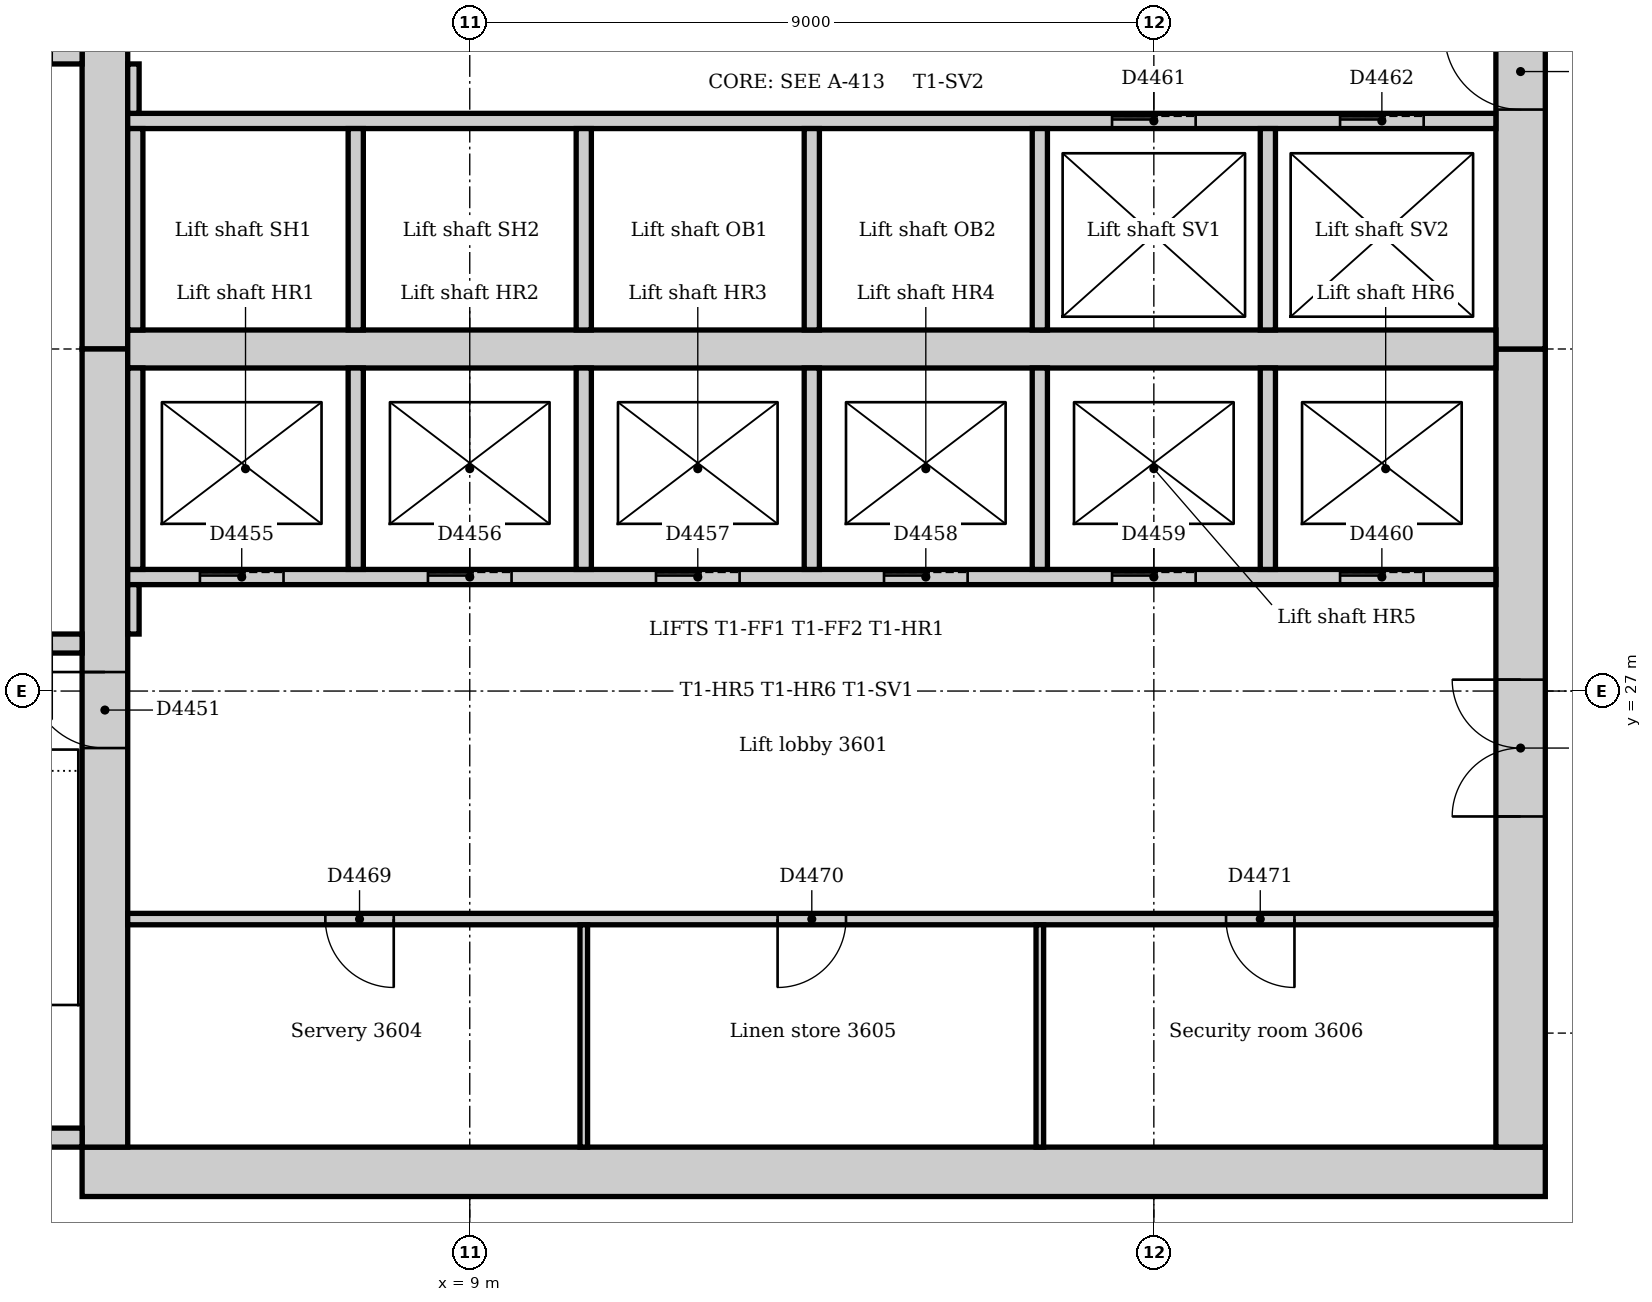
"""IFC4 building model, lengths in metres.
Left out: names, types, materials, properties, quantities, classifications, styles, units other than length and angle.
Written with IfcOpenShell. Run it as: python <this file> out.ifc"""

import sys

from ifc_helpers import new_model, si_unit, direction, frame, frame_2d, origin, place, context, subcontext, project, spatial, rectangle, extrude, element, fill, save


model = new_model("IFC4")
c1 = context("Model", 3, precision=1e-05, world=origin(), true_north=direction((0.0, 1.0)))
c2 = subcontext(c1, "Body", "Model", "MODEL_VIEW")
j1 = project(units=[si_unit("LENGTHUNIT", "METRE"), si_unit("PLANEANGLEUNIT", "RADIAN")], contexts=[c1])
p1 = place(None, origin())
s1 = spatial("IfcSite", under=j1, at=p1, CompositionType="ELEMENT")
p2 = place(p1, origin())
s2 = spatial("IfcBuilding", under=s1, at=p2, CompositionType="ELEMENT")
p3 = place(p2, frame((0.0, 0.0, 153.0)))
s3 = spatial("IfcBuildingStorey", under=s2, at=p3, CompositionType="ELEMENT", Elevation=153.0)
p4 = place(p3, frame((3.9, 20.675, 0.0), z_axis=(0.0, 0.0, 1.0), x_axis=(1.0, 0.0, 0.0)))
e1 = element("IfcWall", 1, at=p4, inside=s3, PredefinedType="SOLIDWALL", context=c2, shape_type="SweptSolid", body=[
    extrude(rectangle(XDim=19.25, YDim=0.65, at=frame_2d((9.625, 0.0))), origin(), (0.0, 0.0, 1.0), 4.0),
])
p5 = place(p3, frame((22.825, 21.0, 0.0), z_axis=(0.0, 0.0, 1.0), x_axis=(0.0, 1.0, 0.0)))
e2 = element("IfcWall", 2, at=p5, inside=s3, PredefinedType="SOLIDWALL", context=c2, shape_type="SweptSolid", body=[
    extrude(rectangle(XDim=10.5, YDim=0.65, at=frame_2d((5.25, 0.0))), origin(), (0.0, 0.0, 1.0), 4.0),
])
p6 = place(p5, frame((4.35, 0.0, 0.0)))
e3 = element("IfcOpeningElement", 3, at=p6, cuts=e2, PredefinedType="OPENING", context=c2, shape_type="SweptSolid", body=[
    extrude(rectangle(XDim=1.8, YDim=2.1, at=frame_2d((0.9, 1.05))), frame((0.0, 0.335, 0.0), z_axis=(0.0, -1.0, 0.0), x_axis=(1.0, 0.0, 0.0)), (0.0, 0.0, 1.0), 0.67),
])
p7 = place(p3, frame((22.825, 31.5, 0.0), z_axis=(0.0, 0.0, 1.0), x_axis=(0.0, 1.0, 0.0)))
e4 = element("IfcWall", 4, at=p7, inside=s3, PredefinedType="SOLIDWALL", context=c2, shape_type="SweptSolid", body=[
    extrude(rectangle(XDim=10.5, YDim=0.65, at=frame_2d((5.25, 0.0))), origin(), (0.0, 0.0, 1.0), 4.0),
])
p8 = place(p7, frame((3.15, 0.0, 0.0)))
e5 = element("IfcOpeningElement", 5, at=p8, cuts=e4, PredefinedType="OPENING", context=c2, shape_type="SweptSolid", body=[
    extrude(rectangle(XDim=1.0, YDim=2.1, at=frame_2d((0.5, 1.05))), frame((0.0, 0.335, 0.0), z_axis=(0.0, -1.0, 0.0), x_axis=(1.0, 0.0, 0.0)), (0.0, 0.0, 1.0), 0.67),
])
p9 = place(p7, frame((5.2, 0.0, 0.0)))
e6 = element("IfcOpeningElement", 6, at=p9, cuts=e4, PredefinedType="OPENING", context=c2, shape_type="SweptSolid", body=[
    extrude(rectangle(XDim=1.0, YDim=2.1, at=frame_2d((0.5, 1.05))), frame((0.0, 0.335, 0.0), z_axis=(0.0, -1.0, 0.0), x_axis=(1.0, 0.0, 0.0)), (0.0, 0.0, 1.0), 0.67),
])
p10 = place(p3, frame((4.2, 42.0, 0.0), z_axis=(0.0, 0.0, 1.0), x_axis=(0.0, -1.0, 0.0)))
e7 = element("IfcWall", 7, at=p10, inside=s3, PredefinedType="SOLIDWALL", context=c2, shape_type="SweptSolid", body=[
    extrude(rectangle(XDim=10.5, YDim=0.6, at=frame_2d((5.25, 0.0))), origin(), (0.0, 0.0, 1.0), 4.0),
])
p11 = place(p10, frame((5.3, 0.0, 0.0)))
e8 = element("IfcOpeningElement", 8, at=p11, cuts=e7, PredefinedType="OPENING", context=c2, shape_type="SweptSolid", body=[
    extrude(rectangle(XDim=1.0, YDim=2.1, at=frame_2d((0.5, 1.05))), frame((0.0, 0.31, 0.0), z_axis=(0.0, -1.0, 0.0), x_axis=(1.0, 0.0, 0.0)), (0.0, 0.0, 1.0), 0.62),
])
p12 = place(p3, frame((4.2, 31.5, 0.0), z_axis=(0.0, 0.0, 1.0), x_axis=(0.0, -1.0, 0.0)))
e9 = element("IfcWall", 9, at=p12, inside=s3, PredefinedType="SOLIDWALL", context=c2, shape_type="SweptSolid", body=[
    extrude(rectangle(XDim=10.5, YDim=0.6, at=frame_2d((5.25, 0.0))), origin(), (0.0, 0.0, 1.0), 4.0),
])
p13 = place(p12, frame((4.25, 0.0, 0.0)))
e10 = element("IfcOpeningElement", 10, at=p13, cuts=e9, PredefinedType="OPENING", context=c2, shape_type="SweptSolid", body=[
    extrude(rectangle(XDim=1.0, YDim=2.1, at=frame_2d((0.5, 1.05))), frame((0.0, 0.31, 0.0), z_axis=(0.0, -1.0, 0.0), x_axis=(1.0, 0.0, 0.0)), (0.0, 0.0, 1.0), 0.62),
])
p14 = place(p3, frame((4.5, 31.5, 0.0), z_axis=(0.0, 0.0, 1.0), x_axis=(1.0, 0.0, 0.0)))
e11 = element("IfcWall", 11, at=p14, inside=s3, PredefinedType="SOLIDWALL", context=c2, shape_type="SweptSolid", body=[
    extrude(rectangle(XDim=18.0, YDim=0.5, at=frame_2d((9.0, 0.0))), origin(), (0.0, 0.0, 1.0), 4.0),
])
p15 = place(p3, frame((0.36, 21.125, 0.0), z_axis=(0.0, 0.0, 1.0), x_axis=(1.0, 0.0, 0.0)))
e12 = element("IfcWall", 12, at=p15, inside=s3, PredefinedType="SOLIDWALL", context=c2, shape_type="SweptSolid", body=[
    extrude(rectangle(XDim=3.54, YDim=0.25, at=frame_2d((1.77, 0.0))), origin(), (0.0, 0.0, 1.0), 4.0),
])
p16 = place(p3, frame((3.9, 27.625, 0.0), z_axis=(0.0, 0.0, 1.0), x_axis=(-1.0, 0.0, 0.0)))
e13 = element("IfcWall", 13, at=p16, inside=s3, PredefinedType="SOLIDWALL", context=c2, shape_type="SweptSolid", body=[
    extrude(rectangle(XDim=3.54, YDim=0.25, at=frame_2d((1.77, 0.0))), origin(), (0.0, 0.0, 1.0), 4.0),
])
p17 = place(p16, frame((0.4, 0.0, 0.0)))
e14 = element("IfcOpeningElement", 14, at=p17, cuts=e13, PredefinedType="OPENING", context=c2, shape_type="SweptSolid", body=[
    extrude(rectangle(XDim=1.0, YDim=2.1, at=frame_2d((0.5, 1.05))), frame((0.0, 0.135, 0.0), z_axis=(0.0, -1.0, 0.0), x_axis=(1.0, 0.0, 0.0)), (0.0, 0.0, 1.0), 0.27),
])
p18 = place(p3, frame((0.36, 35.375, 0.0), z_axis=(0.0, 0.0, 1.0), x_axis=(1.0, 0.0, 0.0)))
e15 = element("IfcWall", 15, at=p18, inside=s3, PredefinedType="SOLIDWALL", context=c2, shape_type="SweptSolid", body=[
    extrude(rectangle(XDim=3.54, YDim=0.25, at=frame_2d((1.77, 0.0))), origin(), (0.0, 0.0, 1.0), 4.0),
])
p19 = place(p18, frame((2.14, 0.0, 0.0)))
e16 = element("IfcOpeningElement", 16, at=p19, cuts=e15, PredefinedType="OPENING", context=c2, shape_type="SweptSolid", body=[
    extrude(rectangle(XDim=1.0, YDim=2.1, at=frame_2d((0.5, 1.05))), frame((0.0, 0.135, 0.0), z_axis=(0.0, -1.0, 0.0), x_axis=(1.0, 0.0, 0.0)), (0.0, 0.0, 1.0), 0.27),
])
p20 = place(p3, frame((4.5, 28.5, 0.0), z_axis=(0.0, 0.0, 1.0), x_axis=(1.0, 0.0, 0.0)))
e17 = element("IfcWall", 17, at=p20, inside=s3, PredefinedType="PARTITIONING", context=c2, shape_type="SweptSolid", body=[
    extrude(rectangle(XDim=18.0, YDim=0.2, at=frame_2d((9.0, 0.0))), origin(), (0.0, 0.0, 1.0), 3.85),
])
p21 = place(p20, frame((0.95, 0.0, 0.0)))
e18 = element("IfcOpeningElement", 18, at=p21, cuts=e17, PredefinedType="OPENING", context=c2, shape_type="SweptSolid", body=[
    extrude(rectangle(XDim=1.1, YDim=2.1, at=frame_2d((0.55, 1.05))), frame((0.0, 0.11, 0.0), z_axis=(0.0, -1.0, 0.0), x_axis=(1.0, 0.0, 0.0)), (0.0, 0.0, 1.0), 0.22),
])
p22 = place(p20, frame((3.95, 0.0, 0.0)))
e19 = element("IfcOpeningElement", 19, at=p22, cuts=e17, PredefinedType="OPENING", context=c2, shape_type="SweptSolid", body=[
    extrude(rectangle(XDim=1.1, YDim=2.1, at=frame_2d((0.55, 1.05))), frame((0.0, 0.11, 0.0), z_axis=(0.0, -1.0, 0.0), x_axis=(1.0, 0.0, 0.0)), (0.0, 0.0, 1.0), 0.22),
])
p23 = place(p20, frame((6.95, 0.0, 0.0)))
e20 = element("IfcOpeningElement", 20, at=p23, cuts=e17, PredefinedType="OPENING", context=c2, shape_type="SweptSolid", body=[
    extrude(rectangle(XDim=1.1, YDim=2.1, at=frame_2d((0.55, 1.05))), frame((0.0, 0.11, 0.0), z_axis=(0.0, -1.0, 0.0), x_axis=(1.0, 0.0, 0.0)), (0.0, 0.0, 1.0), 0.22),
])
p24 = place(p20, frame((9.95, 0.0, 0.0)))
e21 = element("IfcOpeningElement", 21, at=p24, cuts=e17, PredefinedType="OPENING", context=c2, shape_type="SweptSolid", body=[
    extrude(rectangle(XDim=1.1, YDim=2.1, at=frame_2d((0.55, 1.05))), frame((0.0, 0.11, 0.0), z_axis=(0.0, -1.0, 0.0), x_axis=(1.0, 0.0, 0.0)), (0.0, 0.0, 1.0), 0.22),
])
p25 = place(p20, frame((12.95, 0.0, 0.0)))
e22 = element("IfcOpeningElement", 22, at=p25, cuts=e17, PredefinedType="OPENING", context=c2, shape_type="SweptSolid", body=[
    extrude(rectangle(XDim=1.1, YDim=2.1, at=frame_2d((0.55, 1.05))), frame((0.0, 0.11, 0.0), z_axis=(0.0, -1.0, 0.0), x_axis=(1.0, 0.0, 0.0)), (0.0, 0.0, 1.0), 0.22),
])
p26 = place(p20, frame((15.95, 0.0, 0.0)))
e23 = element("IfcOpeningElement", 23, at=p26, cuts=e17, PredefinedType="OPENING", context=c2, shape_type="SweptSolid", body=[
    extrude(rectangle(XDim=1.1, YDim=2.1, at=frame_2d((0.55, 1.05))), frame((0.0, 0.11, 0.0), z_axis=(0.0, -1.0, 0.0), x_axis=(1.0, 0.0, 0.0)), (0.0, 0.0, 1.0), 0.22),
])
p27 = place(p3, frame((4.5, 34.5, 0.0), z_axis=(0.0, 0.0, 1.0), x_axis=(1.0, 0.0, 0.0)))
e24 = element("IfcWall", 24, at=p27, inside=s3, PredefinedType="PARTITIONING", context=c2, shape_type="SweptSolid", body=[
    extrude(rectangle(XDim=18.0, YDim=0.2, at=frame_2d((9.0, 0.0))), origin(), (0.0, 0.0, 1.0), 3.85),
])
p28 = place(p27, frame((12.95, 0.0, 0.0)))
e25 = element("IfcOpeningElement", 25, at=p28, cuts=e24, PredefinedType="OPENING", context=c2, shape_type="SweptSolid", body=[
    extrude(rectangle(XDim=1.1, YDim=2.1, at=frame_2d((0.55, 1.05))), frame((0.0, 0.11, 0.0), z_axis=(0.0, -1.0, 0.0), x_axis=(1.0, 0.0, 0.0)), (0.0, 0.0, 1.0), 0.22),
])
p29 = place(p27, frame((15.95, 0.0, 0.0)))
e26 = element("IfcOpeningElement", 26, at=p29, cuts=e24, PredefinedType="OPENING", context=c2, shape_type="SweptSolid", body=[
    extrude(rectangle(XDim=1.1, YDim=2.1, at=frame_2d((0.55, 1.05))), frame((0.0, 0.11, 0.0), z_axis=(0.0, -1.0, 0.0), x_axis=(1.0, 0.0, 0.0)), (0.0, 0.0, 1.0), 0.22),
])
for number, where, z_axis, x_axis in (
    (27, (4.6, 31.75, 0.0), (0.0, 0.0, 1.0), (0.0, 1.0, 0.0)),
    (28, (4.6, 28.6, 0.0), (0.0, 0.0, 1.0), (0.0, 1.0, 0.0)),
    (29, (7.5, 28.6, 0.0), (0.0, 0.0, 1.0), (0.0, 1.0, 0.0)),
    (30, (7.5, 31.75, 0.0), (0.0, 0.0, 1.0), (0.0, 1.0, 0.0)),
    (31, (10.5, 28.6, 0.0), (0.0, 0.0, 1.0), (0.0, 1.0, 0.0)),
    (32, (10.5, 31.75, 0.0), (0.0, 0.0, 1.0), (0.0, 1.0, 0.0)),
    (33, (13.5, 28.6, 0.0), (0.0, 0.0, 1.0), (0.0, 1.0, 0.0)),
    (34, (13.5, 31.75, 0.0), (0.0, 0.0, 1.0), (0.0, 1.0, 0.0)),
    (35, (16.5, 28.6, 0.0), (0.0, 0.0, 1.0), (0.0, 1.0, 0.0)),
    (36, (16.5, 31.75, 0.0), (0.0, 0.0, 1.0), (0.0, 1.0, 0.0)),
    (37, (19.5, 28.6, 0.0), (0.0, 0.0, 1.0), (0.0, 1.0, 0.0)),
    (38, (19.5, 31.75, 0.0), (0.0, 0.0, 1.0), (0.0, 1.0, 0.0)),
):
    element("IfcWall", number, at=place(p3, frame(where, z_axis=z_axis, x_axis=x_axis)), inside=s3, PredefinedType="PARTITIONING", context=c2, shape_type="SweptSolid", body=[
        extrude(rectangle(XDim=2.65, YDim=0.2, at=frame_2d((1.325, 0.0))), origin(), (0.0, 0.0, 1.0), 3.85),
    ])
p30 = place(p3, frame((4.5, 24.0, 0.0), z_axis=(0.0, 0.0, 1.0), x_axis=(1.0, 0.0, 0.0)))
e39 = element("IfcWall", 39, at=p30, inside=s3, PredefinedType="PARTITIONING", context=c2, shape_type="SweptSolid", body=[
    extrude(rectangle(XDim=18.0, YDim=0.15, at=frame_2d((9.0, 0.0))), origin(), (0.0, 0.0, 1.0), 3.85),
])
p31 = place(p30, frame((2.6, 0.0, 0.0)))
e40 = element("IfcOpeningElement", 40, at=p31, cuts=e39, PredefinedType="OPENING", context=c2, shape_type="SweptSolid", body=[
    extrude(rectangle(XDim=0.9, YDim=2.1, at=frame_2d((0.45, 1.05))), frame((0.0, 0.085, 0.0), z_axis=(0.0, -1.0, 0.0), x_axis=(1.0, 0.0, 0.0)), (0.0, 0.0, 1.0), 0.17),
])
p32 = place(p30, frame((8.55, 0.0, 0.0)))
e41 = element("IfcOpeningElement", 41, at=p32, cuts=e39, PredefinedType="OPENING", context=c2, shape_type="SweptSolid", body=[
    extrude(rectangle(XDim=0.9, YDim=2.1, at=frame_2d((0.45, 1.05))), frame((0.0, 0.085, 0.0), z_axis=(0.0, -1.0, 0.0), x_axis=(1.0, 0.0, 0.0)), (0.0, 0.0, 1.0), 0.17),
])
p33 = place(p30, frame((14.45, 0.0, 0.0)))
e42 = element("IfcOpeningElement", 42, at=p33, cuts=e39, PredefinedType="OPENING", context=c2, shape_type="SweptSolid", body=[
    extrude(rectangle(XDim=0.9, YDim=2.1, at=frame_2d((0.45, 1.05))), frame((0.0, 0.085, 0.0), z_axis=(0.0, -1.0, 0.0), x_axis=(1.0, 0.0, 0.0)), (0.0, 0.0, 1.0), 0.17),
])
for number, where, z_axis, x_axis in (
    (43, (4.575, 27.75, 0.0), (0.0, 0.0, 1.0), (0.0, 1.0, 0.0)),
    (44, (4.575, 34.6, 0.0), (0.0, 0.0, 1.0), (0.0, 1.0, 0.0)),
):
    element("IfcWall", number, at=place(p3, frame(where, z_axis=z_axis, x_axis=x_axis)), inside=s3, PredefinedType="PARTITIONING", context=c2, shape_type="SweptSolid", body=[
        extrude(rectangle(XDim=0.65, YDim=0.15, at=frame_2d((0.325, 0.0))), origin(), (0.0, 0.0, 1.0), 3.85),
    ])
for number, where, z_axis, x_axis in (
    (45, (10.5, 21.0, 0.0), (0.0, 0.0, 1.0), (0.0, 1.0, 0.0)),
    (46, (16.5, 21.0, 0.0), (0.0, 0.0, 1.0), (0.0, 1.0, 0.0)),
):
    element("IfcWall", number, at=place(p3, frame(where, z_axis=z_axis, x_axis=x_axis)), inside=s3, PredefinedType="PARTITIONING", context=c2, shape_type="SweptSolid", body=[
        extrude(rectangle(XDim=2.925, YDim=0.1, at=frame_2d((1.462, 0.0))), origin(), (0.0, 0.0, 1.0), 3.85),
    ])
p34 = place(p13, frame((1.0, 0.0, 0.0), z_axis=(0.0, 0.0, 1.0), x_axis=(-1.0, 0.0, 0.0)))
e47 = element("IfcDoor", 47, at=p34, inside=s3, OperationType="SINGLE_SWING_RIGHT", PredefinedType="DOOR", context=c2, shape_type="SweptSolid", body=[
    extrude(rectangle(XDim=1.0, YDim=2.1, at=frame_2d((0.5, 1.05))), frame((0.0, 0.025, 0.0), z_axis=(0.0, -1.0, 0.0), x_axis=(1.0, 0.0, 0.0)), (0.0, 0.0, 1.0), 0.05),
])
fill(e10, e47)
p35 = place(p21, origin())
e48 = element("IfcDoor", 48, at=p35, inside=s3, OperationType="SLIDING_TO_LEFT", PredefinedType="DOOR", context=c2, shape_type="SweptSolid", body=[
    extrude(rectangle(XDim=1.1, YDim=2.1, at=frame_2d((0.55, 1.05))), frame((0.0, 0.025, 0.0), z_axis=(0.0, -1.0, 0.0), x_axis=(1.0, 0.0, 0.0)), (0.0, 0.0, 1.0), 0.05),
])
fill(e18, e48)
p36 = place(p22, origin())
e49 = element("IfcDoor", 49, at=p36, inside=s3, OperationType="SLIDING_TO_LEFT", PredefinedType="DOOR", context=c2, shape_type="SweptSolid", body=[
    extrude(rectangle(XDim=1.1, YDim=2.1, at=frame_2d((0.55, 1.05))), frame((0.0, 0.025, 0.0), z_axis=(0.0, -1.0, 0.0), x_axis=(1.0, 0.0, 0.0)), (0.0, 0.0, 1.0), 0.05),
])
fill(e19, e49)
p37 = place(p23, origin())
e50 = element("IfcDoor", 50, at=p37, inside=s3, OperationType="SLIDING_TO_LEFT", PredefinedType="DOOR", context=c2, shape_type="SweptSolid", body=[
    extrude(rectangle(XDim=1.1, YDim=2.1, at=frame_2d((0.55, 1.05))), frame((0.0, 0.025, 0.0), z_axis=(0.0, -1.0, 0.0), x_axis=(1.0, 0.0, 0.0)), (0.0, 0.0, 1.0), 0.05),
])
fill(e20, e50)
p38 = place(p24, origin())
e51 = element("IfcDoor", 51, at=p38, inside=s3, OperationType="SLIDING_TO_LEFT", PredefinedType="DOOR", context=c2, shape_type="SweptSolid", body=[
    extrude(rectangle(XDim=1.1, YDim=2.1, at=frame_2d((0.55, 1.05))), frame((0.0, 0.025, 0.0), z_axis=(0.0, -1.0, 0.0), x_axis=(1.0, 0.0, 0.0)), (0.0, 0.0, 1.0), 0.05),
])
fill(e21, e51)
p39 = place(p25, origin())
e52 = element("IfcDoor", 52, at=p39, inside=s3, OperationType="SLIDING_TO_LEFT", PredefinedType="DOOR", context=c2, shape_type="SweptSolid", body=[
    extrude(rectangle(XDim=1.1, YDim=2.1, at=frame_2d((0.55, 1.05))), frame((0.0, 0.025, 0.0), z_axis=(0.0, -1.0, 0.0), x_axis=(1.0, 0.0, 0.0)), (0.0, 0.0, 1.0), 0.05),
])
fill(e22, e52)
p40 = place(p26, origin())
e53 = element("IfcDoor", 53, at=p40, inside=s3, OperationType="SLIDING_TO_LEFT", PredefinedType="DOOR", context=c2, shape_type="SweptSolid", body=[
    extrude(rectangle(XDim=1.1, YDim=2.1, at=frame_2d((0.55, 1.05))), frame((0.0, 0.025, 0.0), z_axis=(0.0, -1.0, 0.0), x_axis=(1.0, 0.0, 0.0)), (0.0, 0.0, 1.0), 0.05),
])
fill(e23, e53)
p41 = place(p28, origin())
e54 = element("IfcDoor", 54, at=p41, inside=s3, OperationType="SLIDING_TO_LEFT", PredefinedType="DOOR", context=c2, shape_type="SweptSolid", body=[
    extrude(rectangle(XDim=1.1, YDim=2.1, at=frame_2d((0.55, 1.05))), frame((0.0, 0.025, 0.0), z_axis=(0.0, -1.0, 0.0), x_axis=(1.0, 0.0, 0.0)), (0.0, 0.0, 1.0), 0.05),
])
fill(e25, e54)
p42 = place(p29, origin())
e55 = element("IfcDoor", 55, at=p42, inside=s3, OperationType="SLIDING_TO_LEFT", PredefinedType="DOOR", context=c2, shape_type="SweptSolid", body=[
    extrude(rectangle(XDim=1.1, YDim=2.1, at=frame_2d((0.55, 1.05))), frame((0.0, 0.025, 0.0), z_axis=(0.0, -1.0, 0.0), x_axis=(1.0, 0.0, 0.0)), (0.0, 0.0, 1.0), 0.05),
])
fill(e26, e55)
p43 = place(p6, origin())
e56 = element("IfcDoor", 56, at=p43, inside=s3, OperationType="DOUBLE_DOOR_DOUBLE_SWING", PredefinedType="DOOR", context=c2, shape_type="SweptSolid", body=[
    extrude(rectangle(XDim=1.8, YDim=2.1, at=frame_2d((0.9, 1.05))), frame((0.0, 0.025, 0.0), z_axis=(0.0, -1.0, 0.0), x_axis=(1.0, 0.0, 0.0)), (0.0, 0.0, 1.0), 0.05),
])
fill(e3, e56)
p44 = place(p8, origin())
e57 = element("IfcDoor", 57, at=p44, inside=s3, OperationType="SINGLE_SWING_RIGHT", PredefinedType="DOOR", context=c2, shape_type="SweptSolid", body=[
    extrude(rectangle(XDim=1.0, YDim=2.1, at=frame_2d((0.5, 1.05))), frame((0.0, 0.025, 0.0), z_axis=(0.0, -1.0, 0.0), x_axis=(1.0, 0.0, 0.0)), (0.0, 0.0, 1.0), 0.05),
])
fill(e5, e57)
p45 = place(p31, frame((0.9, 0.0, 0.0), z_axis=(0.0, 0.0, 1.0), x_axis=(-1.0, 0.0, 0.0)))
e58 = element("IfcDoor", 58, at=p45, inside=s3, OperationType="SINGLE_SWING_LEFT", PredefinedType="DOOR", context=c2, shape_type="SweptSolid", body=[
    extrude(rectangle(XDim=0.9, YDim=2.1, at=frame_2d((0.45, 1.05))), frame((0.0, 0.025, 0.0), z_axis=(0.0, -1.0, 0.0), x_axis=(1.0, 0.0, 0.0)), (0.0, 0.0, 1.0), 0.05),
])
fill(e40, e58)
p46 = place(p32, frame((0.9, 0.0, 0.0), z_axis=(0.0, 0.0, 1.0), x_axis=(-1.0, 0.0, 0.0)))
e59 = element("IfcDoor", 59, at=p46, inside=s3, OperationType="SINGLE_SWING_RIGHT", PredefinedType="DOOR", context=c2, shape_type="SweptSolid", body=[
    extrude(rectangle(XDim=0.9, YDim=2.1, at=frame_2d((0.45, 1.05))), frame((0.0, 0.025, 0.0), z_axis=(0.0, -1.0, 0.0), x_axis=(1.0, 0.0, 0.0)), (0.0, 0.0, 1.0), 0.05),
])
fill(e41, e59)
p47 = place(p33, frame((0.9, 0.0, 0.0), z_axis=(0.0, 0.0, 1.0), x_axis=(-1.0, 0.0, 0.0)))
e60 = element("IfcDoor", 60, at=p47, inside=s3, OperationType="SINGLE_SWING_LEFT", PredefinedType="DOOR", context=c2, shape_type="SweptSolid", body=[
    extrude(rectangle(XDim=0.9, YDim=2.1, at=frame_2d((0.45, 1.05))), frame((0.0, 0.025, 0.0), z_axis=(0.0, -1.0, 0.0), x_axis=(1.0, 0.0, 0.0)), (0.0, 0.0, 1.0), 0.05),
])
fill(e42, e60)
save(model, sys.argv[1])
